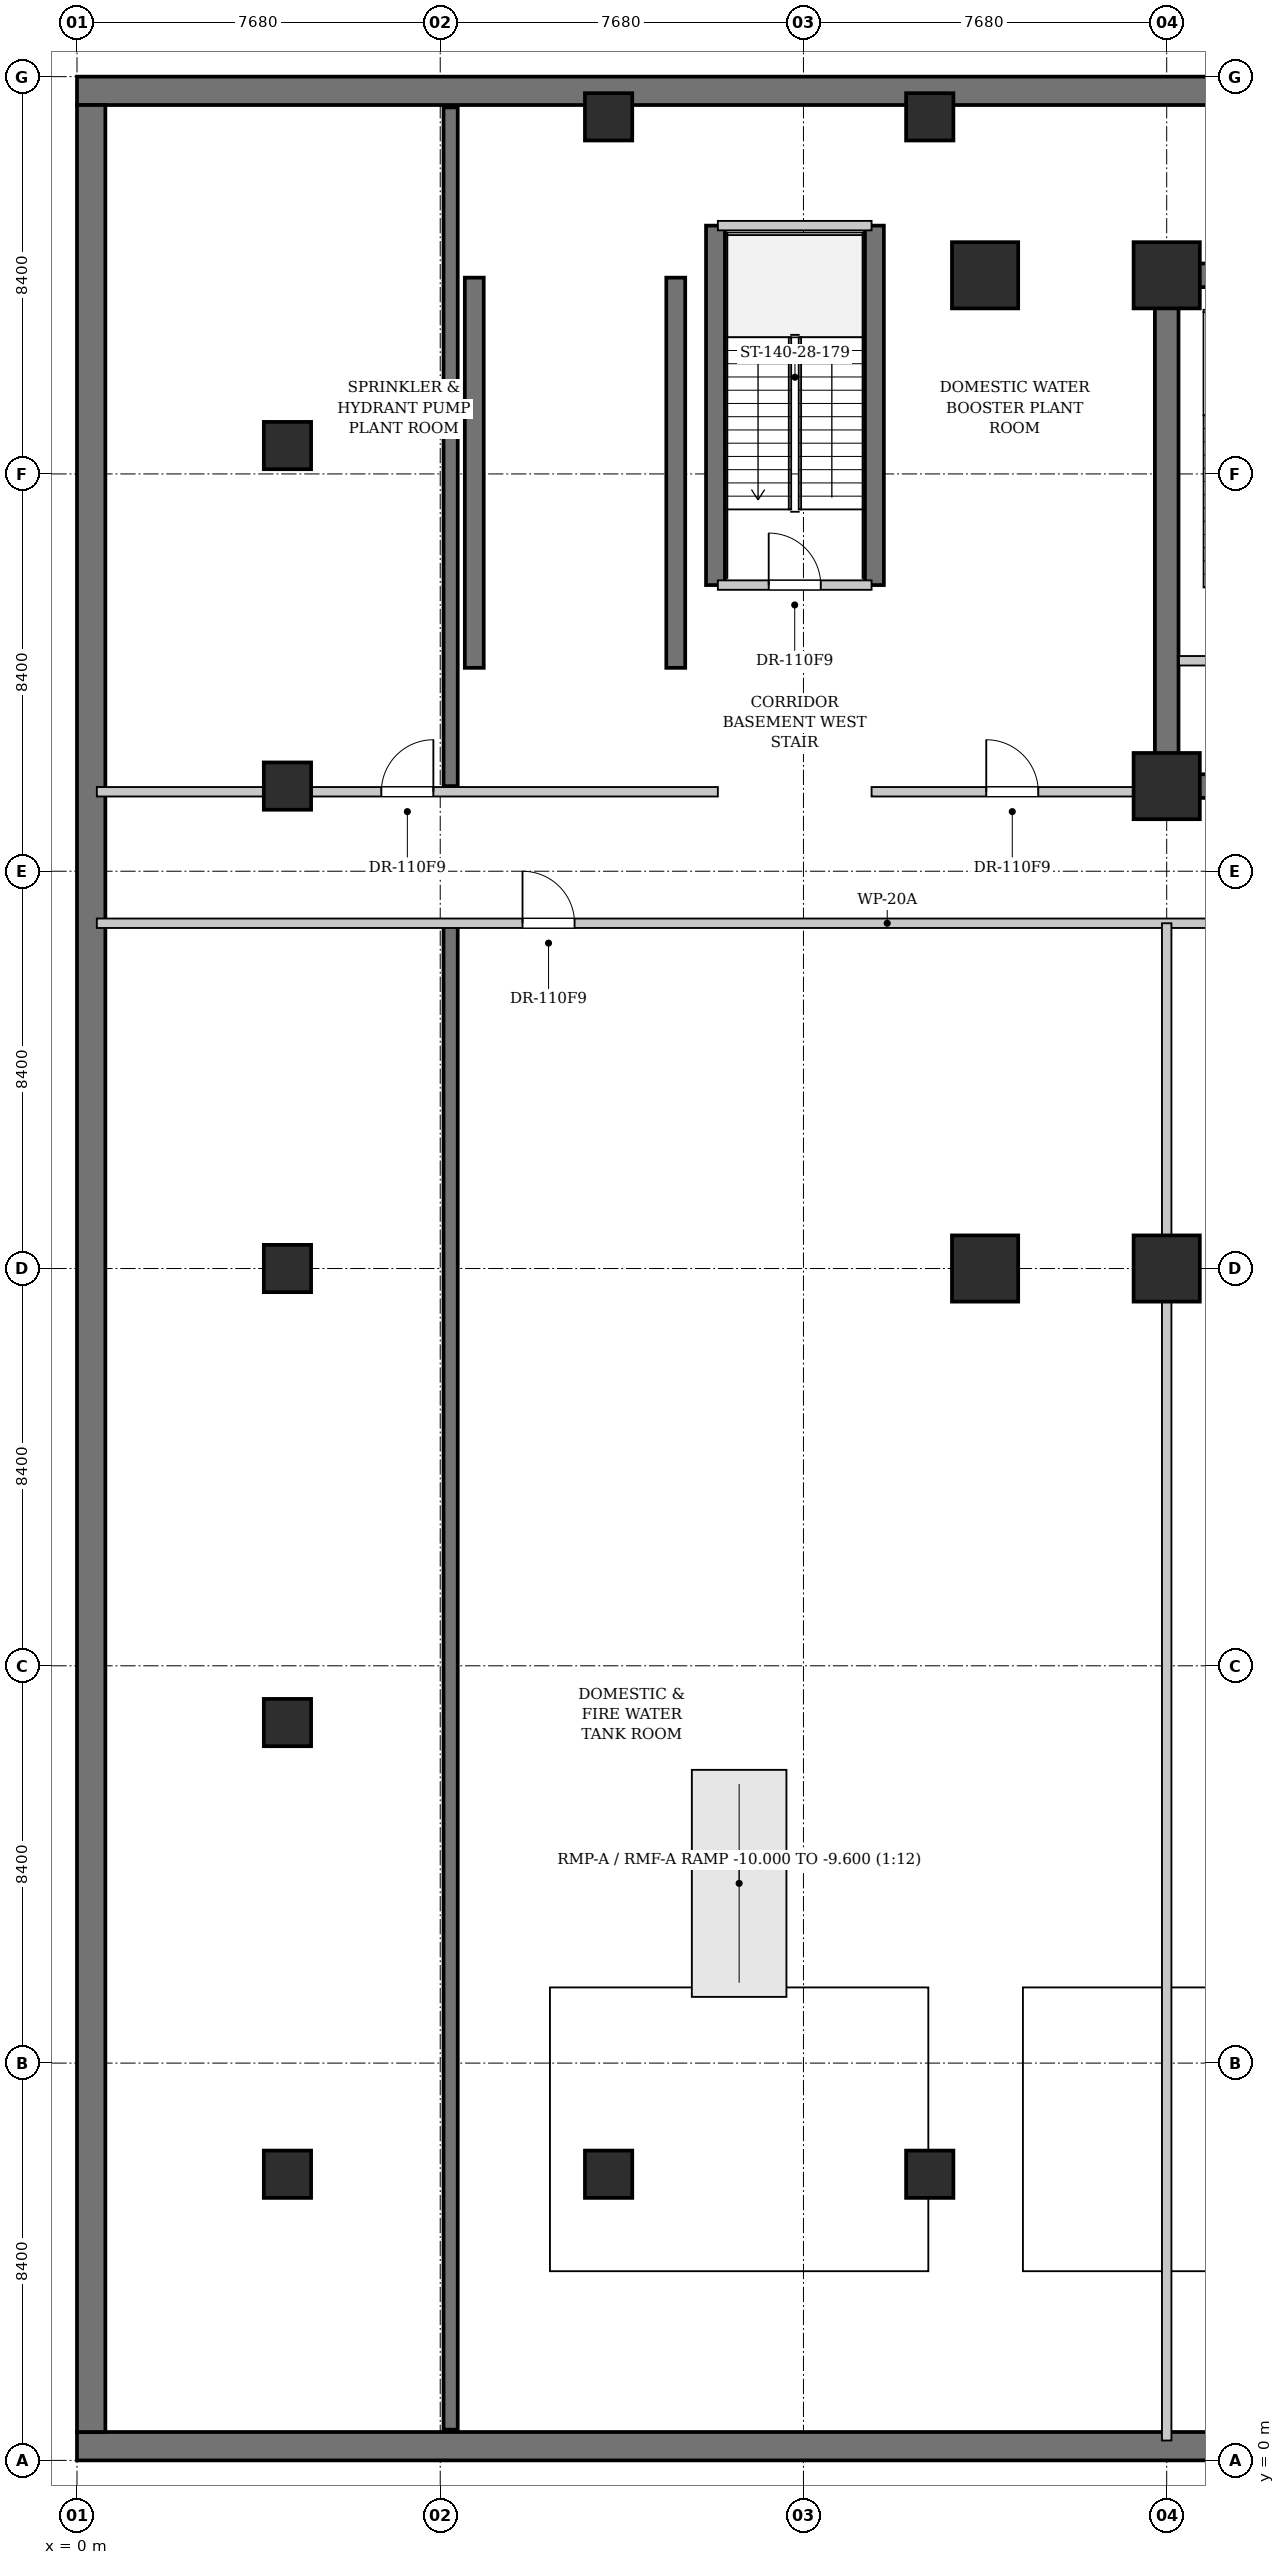
"""IFC4 building model, lengths in metres.
Left out: names, types, materials, properties, quantities, classifications, styles, units other than length and angle.
Written with IfcOpenShell. Run it as: python <this file> out.ifc"""

import sys

from ifc_helpers import new_model, si_unit, direction, frame, frame_2d, origin, origin_2d, place, context, subcontext, project, spatial, rectangle, extrude, element, fill, save


model = new_model("IFC4")
c1 = context("Model", 3, precision=1e-05, world=origin(), true_north=direction((0.0, 1.0)))
c2 = subcontext(c1, "Body", "Model", "MODEL_VIEW")
j1 = project(units=[si_unit("LENGTHUNIT", "METRE"), si_unit("PLANEANGLEUNIT", "RADIAN")], contexts=[c1])
p1 = place(None, origin())
s1 = spatial("IfcSite", under=j1, at=p1, CompositionType="ELEMENT")
p2 = place(p1, origin())
s2 = spatial("IfcBuilding", under=s1, at=p2, CompositionType="ELEMENT")
p3 = place(p2, frame((0.0, 0.0, -10.0)))
s3 = spatial("IfcBuildingStorey", under=s2, at=p3, CompositionType="ELEMENT", Elevation=-10.0)
for number, where, z_axis, x_axis in (
    (1, (0.0, 0.3, 0.0), (0.0, 0.0, 1.0), (1.0, 0.0, 0.0)),
    (2, (0.0, 50.1, 0.0), (0.0, 0.0, 1.0), (1.0, 0.0, 0.0)),
):
    element("IfcWall", number, at=place(p3, frame(where, z_axis=z_axis, x_axis=x_axis)), inside=s3, PredefinedType="USERDEFINED", context=c2, shape_type="SweptSolid", body=[
        extrude(rectangle(XDim=76.8, YDim=0.6, at=frame_2d((38.4, 0.0))), origin(), (0.0, 0.0, 1.0), 4.65),
    ])
p4 = place(p3, frame((0.3, 0.6, 0.0), z_axis=(0.0, 0.0, 1.0), x_axis=(0.0, 1.0, 0.0)))
e3 = element("IfcWall", 3, at=p4, inside=s3, PredefinedType="USERDEFINED", context=c2, shape_type="SweptSolid", body=[
    extrude(rectangle(XDim=49.2, YDim=0.6, at=frame_2d((24.6, 0.0))), origin(), (0.0, 0.0, 1.0), 4.65),
])
p5 = place(p3, frame((22.79, 46.2, 0.0), z_axis=(0.0, 0.0, 1.0), x_axis=(1.0, 0.0, 0.0)))
e4 = element("IfcWall", 4, at=p5, inside=s3, PredefinedType="SHEAR", context=c2, shape_type="SweptSolid", body=[
    extrude(rectangle(XDim=31.22, YDim=0.5, at=frame_2d((15.61, 0.0))), origin(), (0.0, 0.0, 1.0), 4.65),
])
p6 = place(p3, frame((22.79, 35.4, 0.0), z_axis=(0.0, 0.0, 1.0), x_axis=(1.0, 0.0, 0.0)))
e5 = element("IfcWall", 5, at=p6, inside=s3, PredefinedType="SHEAR", context=c2, shape_type="SweptSolid", body=[
    extrude(rectangle(XDim=5.41, YDim=0.5, at=frame_2d((2.705, 0.0))), origin(), (0.0, 0.0, 1.0), 4.65),
])
p7 = place(p3, frame((23.04, 35.65, 0.0), z_axis=(0.0, 0.0, 1.0), x_axis=(0.0, 1.0, 0.0)))
e6 = element("IfcWall", 6, at=p7, inside=s3, PredefinedType="SHEAR", context=c2, shape_type="SweptSolid", body=[
    extrude(rectangle(XDim=10.3, YDim=0.5, at=frame_2d((5.15, 0.0))), origin(), (0.0, 0.0, 1.0), 4.65),
])
p8 = place(p3, frame((7.9, 0.65, 0.0), z_axis=(0.0, 0.0, 1.0), x_axis=(0.0, 1.0, 0.0)))
e7 = element("IfcWall", 7, at=p8, inside=s3, PredefinedType="SHEAR", context=c2, shape_type="SweptSolid", body=[
    extrude(rectangle(XDim=31.85, YDim=0.3, at=frame_2d((15.925, 0.0))), origin(), (0.0, 0.0, 1.0), 4.65),
])
p9 = place(p3, frame((7.9, 35.4, 0.0), z_axis=(0.0, 0.0, 1.0), x_axis=(0.0, 1.0, 0.0)))
e8 = element("IfcWall", 8, at=p9, inside=s3, PredefinedType="SHEAR", context=c2, shape_type="SweptSolid", body=[
    extrude(rectangle(XDim=14.35, YDim=0.3, at=frame_2d((7.175, 0.0))), origin(), (0.0, 0.0, 1.0), 4.65),
])
for number, where, z_axis, x_axis in (
    (9, (8.4, 37.9, 0.0), (0.0, 0.0, 1.0), (0.0, 1.0, 0.0)),
    (10, (12.66, 37.9, 0.0), (0.0, 0.0, 1.0), (0.0, 1.0, 0.0)),
):
    element("IfcWall", number, at=place(p3, frame(where, z_axis=z_axis, x_axis=x_axis)), inside=s3, PredefinedType="SHEAR", context=c2, shape_type="SweptSolid", body=[
        extrude(rectangle(XDim=8.25, YDim=0.4, at=frame_2d((4.125, 0.0))), origin(), (0.0, 0.0, 1.0), 4.65),
    ])
for number, where, z_axis, x_axis in (
    (11, (13.5, 39.65, 0.0), (0.0, 0.0, 1.0), (0.0, 1.0, 0.0)),
    (12, (16.86, 39.65, 0.0), (0.0, 0.0, 1.0), (0.0, 1.0, 0.0)),
):
    element("IfcWall", number, at=place(p3, frame(where, z_axis=z_axis, x_axis=x_axis)), inside=s3, PredefinedType="SHEAR", context=c2, shape_type="SweptSolid", body=[
        extrude(rectangle(XDim=7.6, YDim=0.4, at=frame_2d((3.8, 0.0))), origin(), (0.0, 0.0, 1.0), 4.65),
    ])
for number, where, z_axis, x_axis in (
    (13, (23.04, 35.4, 0.0), (0.0, 0.0, 1.0), (1.0, 0.0, 0.0)),
    (14, (23.04, 46.2, 0.0), (0.0, 0.0, 1.0), (1.0, 0.0, 0.0)),
    (15, (23.04, 25.2, 0.0), (0.0, 0.0, 1.0), (1.0, 0.0, 0.0)),
    (16, (19.2, 25.2, 0.0), (0.0, 0.0, 1.0), (1.0, 0.0, 0.0)),
    (17, (19.2, 46.2, 0.0), (0.0, 0.0, 1.0), (1.0, 0.0, 0.0)),
):
    element("IfcColumn", number, at=place(p3, frame(where, z_axis=z_axis, x_axis=x_axis)), inside=s3, PredefinedType="COLUMN", context=c2, shape_type="SweptSolid", body=[
        extrude(rectangle(XDim=1.4, YDim=1.4, at=origin_2d()), origin(), (0.0, 0.0, 1.0), 5.0),
    ])
for number, where, z_axis, x_axis in (
    (18, (4.45, 6.05, 0.0), (0.0, 0.0, 1.0), (1.0, 0.0, 0.0)),
    (19, (11.24, 6.05, 0.0), (0.0, 0.0, 1.0), (1.0, 0.0, 0.0)),
    (20, (11.24, 49.55, 0.0), (0.0, 0.0, 1.0), (1.0, 0.0, 0.0)),
    (21, (18.03, 6.05, 0.0), (0.0, 0.0, 1.0), (1.0, 0.0, 0.0)),
    (22, (18.03, 49.55, 0.0), (0.0, 0.0, 1.0), (1.0, 0.0, 0.0)),
    (23, (4.45, 15.6, 0.0), (0.0, 0.0, 1.0), (1.0, 0.0, 0.0)),
    (24, (4.45, 25.2, 0.0), (0.0, 0.0, 1.0), (1.0, 0.0, 0.0)),
    (25, (4.45, 35.4, 0.0), (0.0, 0.0, 1.0), (1.0, 0.0, 0.0)),
    (26, (4.45, 42.6, 0.0), (0.0, 0.0, 1.0), (1.0, 0.0, 0.0)),
):
    element("IfcColumn", number, at=place(p3, frame(where, z_axis=z_axis, x_axis=x_axis)), inside=s3, PredefinedType="COLUMN", context=c2, shape_type="SweptSolid", body=[
        extrude(rectangle(XDim=1.0, YDim=1.0, at=origin_2d()), origin(), (0.0, 0.0, 1.0), 5.0),
    ])
p10 = place(p3, frame((23.3, 38.05, 0.0), z_axis=(0.0, 0.0, 1.0), x_axis=(1.0, 0.0, 0.0)))
e27 = element("IfcWall", 27, at=p10, inside=s3, PredefinedType="PARTITIONING", context=c2, shape_type="SweptSolid", body=[
    extrude(rectangle(XDim=3.62, YDim=0.2, at=frame_2d((1.81, 0.0))), origin(), (0.0, 0.0, 1.0), 4.65),
])
p11 = place(p10, frame((1.26, 0.0, 0.0)))
e28 = element("IfcOpeningElement", 28, at=p11, cuts=e27, PredefinedType="OPENING", context=c2, shape_type="SweptSolid", body=[
    extrude(rectangle(XDim=1.1, YDim=2.15, at=frame_2d((0.55, 1.075))), frame((0.0, 0.11, 0.0), z_axis=(0.0, -1.0, 0.0), x_axis=(1.0, 0.0, 0.0)), (0.0, 0.0, 1.0), 0.22),
])
p12 = place(p3, frame((13.55, 47.25, 0.0), z_axis=(0.0, 0.0, 1.0), x_axis=(1.0, 0.0, 0.0)))
e29 = element("IfcWall", 29, at=p12, inside=s3, PredefinedType="PARTITIONING", context=c2, shape_type="SweptSolid", body=[
    extrude(rectangle(XDim=3.25, YDim=0.2, at=frame_2d((1.625, 0.0))), origin(), (0.0, 0.0, 1.0), 4.65),
])
p13 = place(p3, frame((13.55, 39.65, 0.0), z_axis=(0.0, 0.0, 1.0), x_axis=(1.0, 0.0, 0.0)))
e30 = element("IfcWall", 30, at=p13, inside=s3, PredefinedType="PARTITIONING", context=c2, shape_type="SweptSolid", body=[
    extrude(rectangle(XDim=3.25, YDim=0.2, at=frame_2d((1.625, 0.0))), origin(), (0.0, 0.0, 1.0), 4.65),
])
p14 = place(p13, frame((1.075, 0.0, 0.0)))
e31 = element("IfcOpeningElement", 31, at=p14, cuts=e30, PredefinedType="OPENING", context=c2, shape_type="SweptSolid", body=[
    extrude(rectangle(XDim=1.1, YDim=2.15, at=frame_2d((0.55, 1.075))), frame((0.0, 0.11, 0.0), z_axis=(0.0, -1.0, 0.0), x_axis=(1.0, 0.0, 0.0)), (0.0, 0.0, 1.0), 0.22),
])
p15 = place(p3, frame((0.42, 35.28, 0.0), z_axis=(0.0, 0.0, 1.0), x_axis=(1.0, 0.0, 0.0)))
e32 = element("IfcWall", 32, at=p15, inside=s3, PredefinedType="PARTITIONING", context=c2, shape_type="SweptSolid", body=[
    extrude(rectangle(XDim=13.13, YDim=0.2, at=frame_2d((6.565, 0.0))), origin(), (0.0, 0.0, 1.0), 4.65),
])
p16 = place(p15, frame((6.015, 0.0, 0.0)))
e33 = element("IfcOpeningElement", 33, at=p16, cuts=e32, PredefinedType="OPENING", context=c2, shape_type="SweptSolid", body=[
    extrude(rectangle(XDim=1.1, YDim=2.15, at=frame_2d((0.55, 1.075))), frame((0.0, 0.11, 0.0), z_axis=(0.0, -1.0, 0.0), x_axis=(1.0, 0.0, 0.0)), (0.0, 0.0, 1.0), 0.22),
])
p17 = place(p3, frame((16.8, 35.28, 0.0), z_axis=(0.0, 0.0, 1.0), x_axis=(1.0, 0.0, 0.0)))
e34 = element("IfcWall", 34, at=p17, inside=s3, PredefinedType="PARTITIONING", context=c2, shape_type="SweptSolid", body=[
    extrude(rectangle(XDim=5.95, YDim=0.2, at=frame_2d((2.975, 0.0))), origin(), (0.0, 0.0, 1.0), 3.845),
])
p18 = place(p17, frame((2.425, 0.0, 0.0)))
e35 = element("IfcOpeningElement", 35, at=p18, cuts=e34, PredefinedType="OPENING", context=c2, shape_type="SweptSolid", body=[
    extrude(rectangle(XDim=1.1, YDim=2.15, at=frame_2d((0.55, 1.075))), frame((0.0, 0.11, 0.0), z_axis=(0.0, -1.0, 0.0), x_axis=(1.0, 0.0, 0.0)), (0.0, 0.0, 1.0), 0.22),
])
p19 = place(p3, frame((0.42, 32.5, 0.0), z_axis=(0.0, 0.0, 1.0), x_axis=(1.0, 0.0, 0.0)))
e36 = element("IfcWall", 36, at=p19, inside=s3, PredefinedType="PARTITIONING", context=c2, shape_type="SweptSolid", body=[
    extrude(rectangle(XDim=75.96, YDim=0.2, at=frame_2d((37.98, 0.0))), origin(), (0.0, 0.0, 1.0), 3.845),
])
p20 = place(p19, frame((9.0, 0.0, 0.0)))
e37 = element("IfcOpeningElement", 37, at=p20, cuts=e36, PredefinedType="OPENING", context=c2, shape_type="SweptSolid", body=[
    extrude(rectangle(XDim=1.1, YDim=2.15, at=frame_2d((0.55, 1.075))), frame((0.0, 0.11, 0.0), z_axis=(0.0, -1.0, 0.0), x_axis=(1.0, 0.0, 0.0)), (0.0, 0.0, 1.0), 0.22),
])
p21 = place(p19, frame((31.0, 0.0, 0.0)))
e38 = element("IfcOpeningElement", 38, at=p21, cuts=e36, PredefinedType="OPENING", context=c2, shape_type="SweptSolid", body=[
    extrude(rectangle(XDim=1.1, YDim=2.15, at=frame_2d((0.55, 1.075))), frame((0.0, 0.11, 0.0), z_axis=(0.0, -1.0, 0.0), x_axis=(1.0, 0.0, 0.0)), (0.0, 0.0, 1.0), 0.22),
])
p22 = place(p19, frame((49.0, 0.0, 0.0)))
e39 = element("IfcOpeningElement", 39, at=p22, cuts=e36, PredefinedType="OPENING", context=c2, shape_type="SweptSolid", body=[
    extrude(rectangle(XDim=1.1, YDim=2.15, at=frame_2d((0.55, 1.075))), frame((0.0, 0.11, 0.0), z_axis=(0.0, -1.0, 0.0), x_axis=(1.0, 0.0, 0.0)), (0.0, 0.0, 1.0), 0.22),
])
p23 = place(p19, frame((64.0, 0.0, 0.0)))
e40 = element("IfcOpeningElement", 40, at=p23, cuts=e36, PredefinedType="OPENING", context=c2, shape_type="SweptSolid", body=[
    extrude(rectangle(XDim=1.1, YDim=2.15, at=frame_2d((0.55, 1.075))), frame((0.0, 0.11, 0.0), z_axis=(0.0, -1.0, 0.0), x_axis=(1.0, 0.0, 0.0)), (0.0, 0.0, 1.0), 0.22),
])
p24 = place(p3, frame((23.04, 0.42, 0.0), z_axis=(0.0, 0.0, 1.0), x_axis=(0.0, 1.0, 0.0)))
e41 = element("IfcWall", 41, at=p24, inside=s3, PredefinedType="PARTITIONING", context=c2, shape_type="SweptSolid", body=[
    extrude(rectangle(XDim=32.08, YDim=0.2, at=frame_2d((16.04, 0.0))), origin(), (0.0, 0.0, 1.0), 3.845),
])
p25 = place(p14, origin())
e42 = element("IfcDoor", 42, at=p25, inside=s3, OperationType="SINGLE_SWING_LEFT", PredefinedType="DOOR", context=c2, shape_type="SweptSolid", body=[
    extrude(rectangle(XDim=1.1, YDim=2.15, at=frame_2d((0.55, 1.075))), frame((0.0, 0.025, 0.0), z_axis=(0.0, -1.0, 0.0), x_axis=(1.0, 0.0, 0.0)), (0.0, 0.0, 1.0), 0.05),
])
fill(e31, e42)
p26 = place(p16, origin())
e43 = element("IfcDoor", 43, at=p26, inside=s3, OperationType="SINGLE_SWING_RIGHT", PredefinedType="DOOR", context=c2, shape_type="SweptSolid", body=[
    extrude(rectangle(XDim=1.1, YDim=2.15, at=frame_2d((0.55, 1.075))), frame((0.0, 0.025, 0.0), z_axis=(0.0, -1.0, 0.0), x_axis=(1.0, 0.0, 0.0)), (0.0, 0.0, 1.0), 0.05),
])
fill(e33, e43)
p27 = place(p18, origin())
e44 = element("IfcDoor", 44, at=p27, inside=s3, OperationType="SINGLE_SWING_LEFT", PredefinedType="DOOR", context=c2, shape_type="SweptSolid", body=[
    extrude(rectangle(XDim=1.1, YDim=2.15, at=frame_2d((0.55, 1.075))), frame((0.0, 0.025, 0.0), z_axis=(0.0, -1.0, 0.0), x_axis=(1.0, 0.0, 0.0)), (0.0, 0.0, 1.0), 0.05),
])
fill(e35, e44)
p28 = place(p20, origin())
e45 = element("IfcDoor", 45, at=p28, inside=s3, OperationType="SINGLE_SWING_LEFT", PredefinedType="DOOR", context=c2, shape_type="SweptSolid", body=[
    extrude(rectangle(XDim=1.1, YDim=2.15, at=frame_2d((0.55, 1.075))), frame((0.0, 0.025, 0.0), z_axis=(0.0, -1.0, 0.0), x_axis=(1.0, 0.0, 0.0)), (0.0, 0.0, 1.0), 0.05),
])
fill(e37, e45)
save(model, sys.argv[1])
